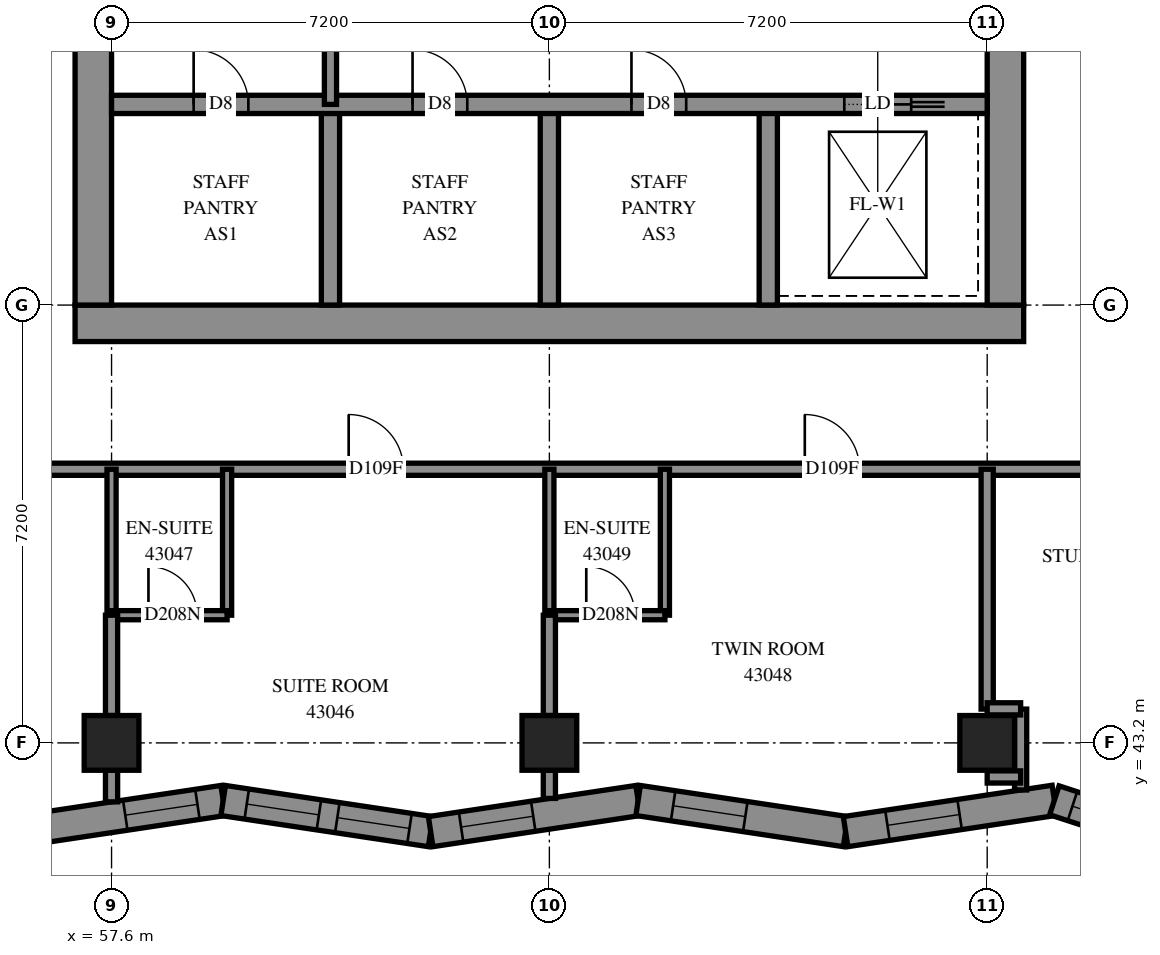
"""IFC4 building model, lengths in metres.
Left out: names, types, materials, properties, quantities, classifications, styles, units other than length and angle.
Written with IfcOpenShell. Run it as: python <this file> out.ifc"""

import sys

from ifc_helpers import new_model, si_unit, direction, frame, frame_2d, origin, origin_2d, place, context, subcontext, project, spatial, polyline, rectangle, outline, extrude, element, fill, save


model = new_model("IFC4")
c1 = context("Model", 3, precision=1e-05, world=origin(), true_north=direction((0.0, 1.0)))
c2 = subcontext(c1, "Body", "Model", "MODEL_VIEW")
j1 = project(units=[si_unit("LENGTHUNIT", "METRE"), si_unit("PLANEANGLEUNIT", "RADIAN")], contexts=[c1])
p1 = place(None, origin())
s1 = spatial("IfcSite", under=j1, at=p1, CompositionType="ELEMENT")
p2 = place(p1, origin())
s2 = spatial("IfcBuilding", under=s1, at=p2, CompositionType="ELEMENT")
p3 = place(p2, frame((0.0, 0.0, 159.2)))
s3 = spatial("IfcBuildingStorey", under=s2, at=p3, CompositionType="ELEMENT", Elevation=159.2)
for number, where, z_axis, x_axis in (
    (1, (57.6, 43.2, 0.0), (0.0, 0.0, 1.0), (1.0, 0.0, 0.0)),
    (2, (64.8, 43.2, 0.0), (0.0, 0.0, 1.0), (1.0, 0.0, 0.0)),
    (3, (72.0, 43.2, 0.0), (0.0, 0.0, 1.0), (1.0, 0.0, 0.0)),
):
    element("IfcColumn", number, at=place(p3, frame(where, z_axis=z_axis, x_axis=x_axis)), inside=s3, PredefinedType="COLUMN", context=c2, shape_type="SweptSolid", body=[
        extrude(rectangle(XDim=0.9, YDim=0.9, at=origin_2d()), origin(), (0.0, 0.0, 1.0), 3.1),
    ])
p4 = place(p3, frame((57.0, 50.1, -0.3), z_axis=(0.0, 0.0, 1.0), x_axis=(1.0, 0.0, 0.0)))
e4 = element("IfcWall", 4, at=p4, inside=s3, PredefinedType="SHEAR", context=c2, shape_type="SweptSolid", body=[
    extrude(rectangle(XDim=15.6, YDim=0.6, at=frame_2d((7.8, 0.0))), origin(), (0.0, 0.0, 1.0), 2.7),
])
p5 = place(p3, frame((57.3, 50.4, -0.3), z_axis=(0.0, 0.0, 1.0), x_axis=(0.0, 1.0, 0.0)))
e5 = element("IfcWall", 5, at=p5, inside=s3, PredefinedType="SHEAR", context=c2, shape_type="SweptSolid", body=[
    extrude(rectangle(XDim=14.4, YDim=0.6, at=frame_2d((7.2, 0.0))), origin(), (0.0, 0.0, 1.0), 2.7),
])
p6 = place(p5, frame((4.55, 0.0, 0.3)))
e6 = element("IfcOpeningElement", 6, at=p6, cuts=e5, PredefinedType="OPENING", context=c2, shape_type="SweptSolid", body=[
    extrude(rectangle(XDim=1.1, YDim=2.1, at=frame_2d((0.55, 1.05))), frame((0.0, 0.31, 0.0), z_axis=(0.0, -1.0, 0.0), x_axis=(1.0, 0.0, 0.0)), (0.0, 0.0, 1.0), 0.62),
])
p7 = place(p5, frame((11.35, 0.0, 0.3)))
e7 = element("IfcOpeningElement", 7, at=p7, cuts=e5, PredefinedType="OPENING", context=c2, shape_type="SweptSolid", body=[
    extrude(rectangle(XDim=1.1, YDim=2.1, at=frame_2d((0.55, 1.05))), frame((0.0, 0.31, 0.0), z_axis=(0.0, -1.0, 0.0), x_axis=(1.0, 0.0, 0.0)), (0.0, 0.0, 1.0), 0.62),
])
p8 = place(p3, frame((72.3, 50.4, -0.3), z_axis=(0.0, 0.0, 1.0), x_axis=(0.0, 1.0, 0.0)))
e8 = element("IfcWall", 8, at=p8, inside=s3, PredefinedType="SHEAR", context=c2, shape_type="SweptSolid", body=[
    extrude(rectangle(XDim=14.4, YDim=0.6, at=frame_2d((7.2, 0.0))), origin(), (0.0, 0.0, 1.0), 2.7),
])
p9 = place(p8, frame((4.55, 0.0, 0.3)))
e9 = element("IfcOpeningElement", 9, at=p9, cuts=e8, PredefinedType="OPENING", context=c2, shape_type="SweptSolid", body=[
    extrude(rectangle(XDim=1.1, YDim=2.1, at=frame_2d((0.55, 1.05))), frame((0.0, 0.31, 0.0), z_axis=(0.0, -1.0, 0.0), x_axis=(1.0, 0.0, 0.0)), (0.0, 0.0, 1.0), 0.62),
])
p10 = place(p8, frame((11.35, 0.0, 0.3)))
e10 = element("IfcOpeningElement", 10, at=p10, cuts=e8, PredefinedType="OPENING", context=c2, shape_type="SweptSolid", body=[
    extrude(rectangle(XDim=1.1, YDim=2.1, at=frame_2d((0.55, 1.05))), frame((0.0, 0.31, 0.0), z_axis=(0.0, -1.0, 0.0), x_axis=(1.0, 0.0, 0.0)), (0.0, 0.0, 1.0), 0.62),
])
for number, where, z_axis, x_axis in (
    (11, (61.2, 50.4, 0.0), (0.0, 0.0, 1.0), (0.0, 1.0, 0.0)),
    (12, (64.8, 50.4, 0.0), (0.0, 0.0, 1.0), (0.0, 1.0, 0.0)),
    (13, (68.4, 50.4, 0.0), (0.0, 0.0, 1.0), (0.0, 1.0, 0.0)),
):
    element("IfcWall", number, at=place(p3, frame(where, z_axis=z_axis, x_axis=x_axis)), inside=s3, PredefinedType="SOLIDWALL", context=c2, shape_type="SweptSolid", body=[
        extrude(rectangle(XDim=3.3, YDim=0.3, at=frame_2d((1.65, 0.0))), origin(), (0.0, 0.0, 1.0), 3.1),
    ])
p11 = place(p3, frame((57.6, 53.7, 0.0), z_axis=(0.0, 0.0, 1.0), x_axis=(1.0, 0.0, 0.0)))
e14 = element("IfcWall", 14, at=p11, inside=s3, PredefinedType="SOLIDWALL", context=c2, shape_type="SweptSolid", body=[
    extrude(rectangle(XDim=14.4, YDim=0.3, at=frame_2d((7.2, 0.0))), origin(), (0.0, 0.0, 1.0), 3.1),
])
p12 = place(p11, frame((1.35, 0.0, 0.0)))
e15 = element("IfcOpeningElement", 15, at=p12, cuts=e14, PredefinedType="OPENING", context=c2, shape_type="SweptSolid", body=[
    extrude(rectangle(XDim=0.9, YDim=2.1, at=frame_2d((0.45, 1.05))), frame((0.0, 0.16, 0.0), z_axis=(0.0, -1.0, 0.0), x_axis=(1.0, 0.0, 0.0)), (0.0, 0.0, 1.0), 0.32),
])
p13 = place(p11, frame((4.95, 0.0, 0.0)))
e16 = element("IfcOpeningElement", 16, at=p13, cuts=e14, PredefinedType="OPENING", context=c2, shape_type="SweptSolid", body=[
    extrude(rectangle(XDim=0.9, YDim=2.1, at=frame_2d((0.45, 1.05))), frame((0.0, 0.16, 0.0), z_axis=(0.0, -1.0, 0.0), x_axis=(1.0, 0.0, 0.0)), (0.0, 0.0, 1.0), 0.32),
])
p14 = place(p11, frame((8.55, 0.0, 0.0)))
e17 = element("IfcOpeningElement", 17, at=p14, cuts=e14, PredefinedType="OPENING", context=c2, shape_type="SweptSolid", body=[
    extrude(rectangle(XDim=0.9, YDim=2.1, at=frame_2d((0.45, 1.05))), frame((0.0, 0.16, 0.0), z_axis=(0.0, -1.0, 0.0), x_axis=(1.0, 0.0, 0.0)), (0.0, 0.0, 1.0), 0.32),
])
p15 = place(p11, frame((12.05, 0.0, 0.0)))
e18 = element("IfcOpeningElement", 18, at=p15, cuts=e14, PredefinedType="OPENING", context=c2, shape_type="SweptSolid", body=[
    extrude(rectangle(XDim=1.1, YDim=2.1, at=frame_2d((0.55, 1.05))), frame((0.0, 0.16, 0.0), z_axis=(0.0, -1.0, 0.0), x_axis=(1.0, 0.0, 0.0)), (0.0, 0.0, 1.0), 0.32),
])
p16 = place(p3, frame((56.024, 41.741, 0.0), z_axis=(0.0, 0.0, 1.0), x_axis=(0.9889272091, 0.1484013984, 0.0)))
e19 = element("IfcWall", 19, at=p16, inside=s3, PredefinedType="SOLIDWALL", context=c2, shape_type="SweptSolid", body=[
    extrude(outline(polyline([(-0.037, -0.25), (3.413, -0.25), (3.488, 0.25), (0.037, 0.25), (-0.037, -0.25)])), origin(), (0.0, 0.0, 1.0), 3.1),
])
p17 = place(p16, frame((1.822, 0.0, 0.45)))
e20 = element("IfcOpeningElement", 20, at=p17, cuts=e19, PredefinedType="OPENING", context=c2, shape_type="SweptSolid", body=[
    extrude(rectangle(XDim=1.2, YDim=2.5, at=frame_2d((0.6, 1.25))), frame((0.0, 0.26, 0.0), z_axis=(0.0, -1.0, 0.0), x_axis=(1.0, 0.0, 0.0)), (0.0, 0.0, 1.0), 0.52),
])
p18 = place(p3, frame((59.436, 42.253, 0.0), z_axis=(0.0, 0.0, 1.0), x_axis=(0.9889272091, -0.1484013984, 0.0)))
e21 = element("IfcWall", 21, at=p18, inside=s3, PredefinedType="SOLIDWALL", context=c2, shape_type="SweptSolid", body=[
    extrude(outline(polyline([(0.037, -0.25), (3.488, -0.25), (3.413, 0.25), (-0.037, 0.25), (0.037, -0.25)])), origin(), (0.0, 0.0, 1.0), 3.1),
])
p19 = place(p18, frame((0.392, 0.0, 0.45)))
e22 = element("IfcOpeningElement", 22, at=p19, cuts=e21, PredefinedType="OPENING", context=c2, shape_type="SweptSolid", body=[
    extrude(rectangle(XDim=1.2, YDim=2.5, at=frame_2d((0.6, 1.25))), frame((0.0, 0.26, 0.0), z_axis=(0.0, -1.0, 0.0), x_axis=(1.0, 0.0, 0.0)), (0.0, 0.0, 1.0), 0.52),
])
p20 = place(p18, frame((1.898, 0.0, 0.45)))
e23 = element("IfcOpeningElement", 23, at=p20, cuts=e21, PredefinedType="OPENING", context=c2, shape_type="SweptSolid", body=[
    extrude(rectangle(XDim=1.2, YDim=2.5, at=frame_2d((0.6, 1.25))), frame((0.0, 0.26, 0.0), z_axis=(0.0, -1.0, 0.0), x_axis=(1.0, 0.0, 0.0)), (0.0, 0.0, 1.0), 0.52),
])
p21 = place(p3, frame((62.848, 41.741, 0.0), z_axis=(0.0, 0.0, 1.0), x_axis=(0.9889278474, 0.1483971447, 0.0)))
e24 = element("IfcWall", 24, at=p21, inside=s3, PredefinedType="SOLIDWALL", context=c2, shape_type="SweptSolid", body=[
    extrude(outline(polyline([(-0.037, -0.25), (3.413, -0.25), (3.488, 0.25), (0.037, 0.25), (-0.037, -0.25)])), origin(), (0.0, 0.0, 1.0), 3.1),
])
p22 = place(p21, frame((0.506, 0.0, 0.45)))
e25 = element("IfcOpeningElement", 25, at=p22, cuts=e24, PredefinedType="OPENING", context=c2, shape_type="SweptSolid", body=[
    extrude(rectangle(XDim=1.2, YDim=2.5, at=frame_2d((0.6, 1.25))), frame((0.0, 0.26, 0.0), z_axis=(0.0, -1.0, 0.0), x_axis=(1.0, 0.0, 0.0)), (0.0, 0.0, 1.0), 0.52),
])
p23 = place(p3, frame((66.26, 42.253, 0.0), z_axis=(0.0, 0.0, 1.0), x_axis=(0.9889272091, -0.1484013984, 0.0)))
e26 = element("IfcWall", 26, at=p23, inside=s3, PredefinedType="SOLIDWALL", context=c2, shape_type="SweptSolid", body=[
    extrude(outline(polyline([(0.037, -0.25), (3.488, -0.25), (3.413, 0.25), (-0.037, 0.25), (0.037, -0.25)])), origin(), (0.0, 0.0, 1.0), 3.1),
])
p24 = place(p23, frame((0.582, 0.0, 0.45)))
e27 = element("IfcOpeningElement", 27, at=p24, cuts=e26, PredefinedType="OPENING", context=c2, shape_type="SweptSolid", body=[
    extrude(rectangle(XDim=1.2, YDim=2.5, at=frame_2d((0.6, 1.25))), frame((0.0, 0.26, 0.0), z_axis=(0.0, -1.0, 0.0), x_axis=(1.0, 0.0, 0.0)), (0.0, 0.0, 1.0), 0.52),
])
p25 = place(p3, frame((69.671, 41.741, 0.0), z_axis=(0.0, 0.0, 1.0), x_axis=(0.9889270545, 0.1484024288, 0.0)))
e28 = element("IfcWall", 28, at=p25, inside=s3, PredefinedType="SOLIDWALL", context=c2, shape_type="SweptSolid", body=[
    extrude(outline(polyline([(-0.037, -0.25), (3.413, -0.25), (3.531, 0.25), (0.037, 0.25), (-0.037, -0.25)])), origin(), (0.0, 0.0, 1.0), 3.1),
])
p26 = place(p25, frame((0.696, 0.0, 0.45)))
e29 = element("IfcOpeningElement", 29, at=p26, cuts=e28, PredefinedType="OPENING", context=c2, shape_type="SweptSolid", body=[
    extrude(rectangle(XDim=1.2, YDim=2.5, at=frame_2d((0.6, 1.25))), frame((0.0, 0.26, 0.0), z_axis=(0.0, -1.0, 0.0), x_axis=(1.0, 0.0, 0.0)), (0.0, 0.0, 1.0), 0.52),
])
p27 = place(p3, frame((73.105, 42.256, 0.0), z_axis=(0.0, 0.0, 1.0), x_axis=(0.9507748373, -0.3098825725, 0.0)))
e30 = element("IfcWall", 30, at=p27, inside=s3, PredefinedType="SOLIDWALL", context=c2, shape_type="SweptSolid", body=[
    extrude(outline(polyline([(0.059, -0.25), (3.648, -0.25), (3.698, 0.25), (-0.059, 0.25), (0.059, -0.25)])), origin(), (0.0, 0.0, 1.0), 3.1),
])
p28 = place(p27, frame((0.312, 0.0, 0.45)))
e31 = element("IfcOpeningElement", 31, at=p28, cuts=e30, PredefinedType="OPENING", context=c2, shape_type="SweptSolid", body=[
    extrude(rectangle(XDim=1.2, YDim=2.5, at=frame_2d((0.6, 1.25))), frame((0.0, 0.26, 0.0), z_axis=(0.0, -1.0, 0.0), x_axis=(1.0, 0.0, 0.0)), (0.0, 0.0, 1.0), 0.52),
])
p29 = place(p3, frame((61.2, 53.7, 0.0), z_axis=(0.0, 0.0, 1.0), x_axis=(0.0, 1.0, 0.0)))
e32 = element("IfcWall", 32, at=p29, inside=s3, PredefinedType="PARTITIONING", context=c2, shape_type="SweptSolid", body=[
    extrude(rectangle(XDim=3.6, YDim=0.2, at=frame_2d((1.8, 0.0))), origin(), (0.0, 0.0, 1.0), 3.1),
])
p30 = place(p3, frame((54.9, 47.7, 0.0), z_axis=(0.0, 0.0, 1.0), x_axis=(1.0, 0.0, 0.0)))
e33 = element("IfcWall", 33, at=p30, inside=s3, PredefinedType="PARTITIONING", context=c2, shape_type="SweptSolid", body=[
    extrude(rectangle(XDim=19.326, YDim=0.2, at=frame_2d((9.663, 0.0))), origin(), (0.0, 0.0, 1.0), 3.1),
])
p31 = place(p30, frame((6.599, 0.0, 0.0)))
e34 = element("IfcOpeningElement", 34, at=p31, cuts=e33, PredefinedType="OPENING", context=c2, shape_type="SweptSolid", body=[
    extrude(rectangle(XDim=0.9, YDim=2.1, at=frame_2d((0.45, 1.05))), frame((0.0, 0.11, 0.0), z_axis=(0.0, -1.0, 0.0), x_axis=(1.0, 0.0, 0.0)), (0.0, 0.0, 1.0), 0.22),
])
p32 = place(p30, frame((14.101, 0.0, 0.0)))
e35 = element("IfcOpeningElement", 35, at=p32, cuts=e33, PredefinedType="OPENING", context=c2, shape_type="SweptSolid", body=[
    extrude(rectangle(XDim=0.9, YDim=2.1, at=frame_2d((0.45, 1.05))), frame((0.0, 0.11, 0.0), z_axis=(0.0, -1.0, 0.0), x_axis=(1.0, 0.0, 0.0)), (0.0, 0.0, 1.0), 0.22),
])
p33 = place(p3, frame((72.0, 43.756, 0.0), z_axis=(0.0, 0.0, 1.0), x_axis=(0.0, 1.0, 0.0)))
e36 = element("IfcWall", 36, at=p33, inside=s3, PredefinedType="PARTITIONING", context=c2, shape_type="SweptSolid", body=[
    extrude(rectangle(XDim=3.944, YDim=0.2, at=frame_2d((1.972, 0.0))), origin(), (0.0, 0.0, 1.0), 3.1),
])
for number, where, z_axis, x_axis in (
    (37, (59.5, 45.3, 0.0), (0.0, 0.0, 1.0), (0.0, 1.0, 0.0)),
    (38, (57.6, 45.3, 0.0), (0.0, 0.0, 1.0), (0.0, 1.0, 0.0)),
    (39, (66.7, 45.3, 0.0), (0.0, 0.0, 1.0), (0.0, 1.0, 0.0)),
    (40, (64.8, 45.3, 0.0), (0.0, 0.0, 1.0), (0.0, 1.0, 0.0)),
):
    element("IfcWall", number, at=place(p3, frame(where, z_axis=z_axis, x_axis=x_axis)), inside=s3, PredefinedType="PARTITIONING", context=c2, shape_type="SweptSolid", body=[
        extrude(rectangle(XDim=2.4, YDim=0.15, at=frame_2d((1.2, 0.0))), origin(), (0.0, 0.0, 1.0), 3.1),
    ])
p34 = place(p3, frame((64.8, 45.3, 0.0), z_axis=(0.0, 0.0, 1.0), x_axis=(1.0, 0.0, 0.0)))
e41 = element("IfcWall", 41, at=p34, inside=s3, PredefinedType="PARTITIONING", context=c2, shape_type="SweptSolid", body=[
    extrude(rectangle(XDim=1.9, YDim=0.15, at=frame_2d((0.95, 0.0))), origin(), (0.0, 0.0, 1.0), 3.1),
])
p35 = place(p34, frame((0.607, 0.0, 0.0)))
e42 = element("IfcOpeningElement", 42, at=p35, cuts=e41, PredefinedType="OPENING", context=c2, shape_type="SweptSolid", body=[
    extrude(rectangle(XDim=0.8, YDim=2.1, at=frame_2d((0.4, 1.05))), frame((0.0, 0.085, 0.0), z_axis=(0.0, -1.0, 0.0), x_axis=(1.0, 0.0, 0.0)), (0.0, 0.0, 1.0), 0.17),
])
p36 = place(p3, frame((57.6, 45.3, 0.0), z_axis=(0.0, 0.0, 1.0), x_axis=(1.0, 0.0, 0.0)))
e43 = element("IfcWall", 43, at=p36, inside=s3, PredefinedType="PARTITIONING", context=c2, shape_type="SweptSolid", body=[
    extrude(rectangle(XDim=1.9, YDim=0.15, at=frame_2d((0.95, 0.0))), origin(), (0.0, 0.0, 1.0), 3.1),
])
p37 = place(p36, frame((0.607, 0.0, 0.0)))
e44 = element("IfcOpeningElement", 44, at=p37, cuts=e43, PredefinedType="OPENING", context=c2, shape_type="SweptSolid", body=[
    extrude(rectangle(XDim=0.8, YDim=2.1, at=frame_2d((0.4, 1.05))), frame((0.0, 0.085, 0.0), z_axis=(0.0, -1.0, 0.0), x_axis=(1.0, 0.0, 0.0)), (0.0, 0.0, 1.0), 0.17),
])
for number, where, z_axis, x_axis in (
    (45, (57.6, 43.65, 0.0), (0.0, 0.0, 1.0), (0.0, 1.0, 0.0)),
    (46, (64.8, 43.65, 0.0), (0.0, 0.0, 1.0), (0.0, 1.0, 0.0)),
):
    element("IfcWall", number, at=place(p3, frame(where, z_axis=z_axis, x_axis=x_axis)), inside=s3, PredefinedType="PARTITIONING", context=c2, shape_type="SweptSolid", body=[
        extrude(rectangle(XDim=1.65, YDim=0.2, at=frame_2d((0.825, 0.0))), origin(), (0.0, 0.0, 1.0), 3.1),
    ])
p38 = place(p3, frame((72.55, 42.426, 0.0), z_axis=(0.0, 0.0, 1.0), x_axis=(0.0, 1.0, 0.0)))
e47 = element("IfcWall", 47, at=p38, inside=s3, PredefinedType="PARTITIONING", context=c2, shape_type="SweptSolid", body=[
    extrude(rectangle(XDim=1.33, YDim=0.2, at=frame_2d((0.665, 0.0))), origin(), (0.0, 0.0, 1.0), 3.1),
])
for number, where, z_axis, x_axis in (
    (48, (72.0, 43.76, 0.0), (0.0, 0.0, 1.0), (1.0, 0.0, 0.0)),
    (49, (72.0, 42.64, 0.0), (0.0, 0.0, 1.0), (1.0, 0.0, 0.0)),
):
    element("IfcWall", number, at=place(p3, frame(where, z_axis=z_axis, x_axis=x_axis)), inside=s3, PredefinedType="PARTITIONING", context=c2, shape_type="SweptSolid", body=[
        extrude(rectangle(XDim=0.55, YDim=0.2, at=frame_2d((0.275, 0.0))), origin(), (0.0, 0.0, 1.0), 3.1),
    ])
p39 = place(p3, frame((57.6, 42.23, 0.0), z_axis=(0.0, 0.0, 1.0), x_axis=(0.0, 1.0, 0.0)))
e50 = element("IfcWall", 50, at=p39, inside=s3, PredefinedType="PARTITIONING", context=c2, shape_type="SweptSolid", body=[
    extrude(rectangle(XDim=0.52, YDim=0.2, at=frame_2d((0.26, 0.0))), origin(), (0.0, 0.0, 1.0), 3.1),
])
p40 = place(p3, frame((64.8, 42.287, 0.0), z_axis=(0.0, 0.0, 1.0), x_axis=(0.0, 1.0, 0.0)))
e51 = element("IfcWall", 51, at=p40, inside=s3, PredefinedType="PARTITIONING", context=c2, shape_type="SweptSolid", body=[
    extrude(rectangle(XDim=0.463, YDim=0.2, at=frame_2d((0.232, 0.0))), origin(), (0.0, 0.0, 1.0), 3.1),
])
p41 = place(p17, origin())
e52 = element("IfcWindow", 52, at=p41, inside=s3, PartitioningType="SINGLE_PANEL", PredefinedType="WINDOW", context=c2, shape_type="SweptSolid", body=[
    extrude(rectangle(XDim=1.2, YDim=2.5, at=frame_2d((0.6, 1.25))), frame((0.0, 0.18, 0.0), z_axis=(0.0, -1.0, 0.0), x_axis=(1.0, 0.0, 0.0)), (0.0, 0.0, 1.0), 0.06),
])
fill(e20, e52)
p42 = place(p19, origin())
e53 = element("IfcWindow", 53, at=p42, inside=s3, PartitioningType="SINGLE_PANEL", PredefinedType="WINDOW", context=c2, shape_type="SweptSolid", body=[
    extrude(rectangle(XDim=1.2, YDim=2.5, at=frame_2d((0.6, 1.25))), frame((0.0, 0.18, 0.0), z_axis=(0.0, -1.0, 0.0), x_axis=(1.0, 0.0, 0.0)), (0.0, 0.0, 1.0), 0.06),
])
fill(e22, e53)
p43 = place(p20, origin())
e54 = element("IfcWindow", 54, at=p43, inside=s3, PartitioningType="SINGLE_PANEL", PredefinedType="WINDOW", context=c2, shape_type="SweptSolid", body=[
    extrude(rectangle(XDim=1.2, YDim=2.5, at=frame_2d((0.6, 1.25))), frame((0.0, 0.18, 0.0), z_axis=(0.0, -1.0, 0.0), x_axis=(1.0, 0.0, 0.0)), (0.0, 0.0, 1.0), 0.06),
])
fill(e23, e54)
p44 = place(p22, origin())
e55 = element("IfcWindow", 55, at=p44, inside=s3, PartitioningType="SINGLE_PANEL", PredefinedType="WINDOW", context=c2, shape_type="SweptSolid", body=[
    extrude(rectangle(XDim=1.2, YDim=2.5, at=frame_2d((0.6, 1.25))), frame((0.0, 0.18, 0.0), z_axis=(0.0, -1.0, 0.0), x_axis=(1.0, 0.0, 0.0)), (0.0, 0.0, 1.0), 0.06),
])
fill(e25, e55)
p45 = place(p24, origin())
e56 = element("IfcWindow", 56, at=p45, inside=s3, PartitioningType="SINGLE_PANEL", PredefinedType="WINDOW", context=c2, shape_type="SweptSolid", body=[
    extrude(rectangle(XDim=1.2, YDim=2.5, at=frame_2d((0.6, 1.25))), frame((0.0, 0.18, 0.0), z_axis=(0.0, -1.0, 0.0), x_axis=(1.0, 0.0, 0.0)), (0.0, 0.0, 1.0), 0.06),
])
fill(e27, e56)
p46 = place(p26, origin())
e57 = element("IfcWindow", 57, at=p46, inside=s3, PartitioningType="SINGLE_PANEL", PredefinedType="WINDOW", context=c2, shape_type="SweptSolid", body=[
    extrude(rectangle(XDim=1.2, YDim=2.5, at=frame_2d((0.6, 1.25))), frame((0.0, 0.18, 0.0), z_axis=(0.0, -1.0, 0.0), x_axis=(1.0, 0.0, 0.0)), (0.0, 0.0, 1.0), 0.06),
])
fill(e29, e57)
p47 = place(p28, origin())
e58 = element("IfcWindow", 58, at=p47, inside=s3, PartitioningType="SINGLE_PANEL", PredefinedType="WINDOW", context=c2, shape_type="SweptSolid", body=[
    extrude(rectangle(XDim=1.2, YDim=2.5, at=frame_2d((0.6, 1.25))), frame((0.0, 0.18, 0.0), z_axis=(0.0, -1.0, 0.0), x_axis=(1.0, 0.0, 0.0)), (0.0, 0.0, 1.0), 0.06),
])
fill(e31, e58)
p48 = place(p12, origin())
e59 = element("IfcDoor", 59, at=p48, inside=s3, OperationType="SINGLE_SWING_LEFT", PredefinedType="DOOR", context=c2, shape_type="SweptSolid", body=[
    extrude(rectangle(XDim=0.9, YDim=2.1, at=frame_2d((0.45, 1.05))), frame((0.0, 0.025, 0.0), z_axis=(0.0, -1.0, 0.0), x_axis=(1.0, 0.0, 0.0)), (0.0, 0.0, 1.0), 0.05),
])
fill(e15, e59)
p49 = place(p13, origin())
e60 = element("IfcDoor", 60, at=p49, inside=s3, OperationType="SINGLE_SWING_LEFT", PredefinedType="DOOR", context=c2, shape_type="SweptSolid", body=[
    extrude(rectangle(XDim=0.9, YDim=2.1, at=frame_2d((0.45, 1.05))), frame((0.0, 0.025, 0.0), z_axis=(0.0, -1.0, 0.0), x_axis=(1.0, 0.0, 0.0)), (0.0, 0.0, 1.0), 0.05),
])
fill(e16, e60)
p50 = place(p14, origin())
e61 = element("IfcDoor", 61, at=p50, inside=s3, OperationType="SINGLE_SWING_LEFT", PredefinedType="DOOR", context=c2, shape_type="SweptSolid", body=[
    extrude(rectangle(XDim=0.9, YDim=2.1, at=frame_2d((0.45, 1.05))), frame((0.0, 0.025, 0.0), z_axis=(0.0, -1.0, 0.0), x_axis=(1.0, 0.0, 0.0)), (0.0, 0.0, 1.0), 0.05),
])
fill(e17, e61)
p51 = place(p15, origin())
e62 = element("IfcDoor", 62, at=p51, inside=s3, OperationType="SLIDING_TO_RIGHT", PredefinedType="DOOR", context=c2, shape_type="SweptSolid", body=[
    extrude(rectangle(XDim=1.1, YDim=2.1, at=frame_2d((0.55, 1.05))), frame((0.0, 0.025, 0.0), z_axis=(0.0, -1.0, 0.0), x_axis=(1.0, 0.0, 0.0)), (0.0, 0.0, 1.0), 0.05),
])
fill(e18, e62)
p52 = place(p31, origin())
e63 = element("IfcDoor", 63, at=p52, inside=s3, OperationType="SINGLE_SWING_LEFT", PredefinedType="DOOR", context=c2, shape_type="SweptSolid", body=[
    extrude(rectangle(XDim=0.9, YDim=2.1, at=frame_2d((0.45, 1.05))), frame((0.0, 0.025, 0.0), z_axis=(0.0, -1.0, 0.0), x_axis=(1.0, 0.0, 0.0)), (0.0, 0.0, 1.0), 0.05),
])
fill(e34, e63)
p53 = place(p37, origin())
e64 = element("IfcDoor", 64, at=p53, inside=s3, OperationType="SINGLE_SWING_RIGHT", PredefinedType="DOOR", context=c2, shape_type="SweptSolid", body=[
    extrude(rectangle(XDim=0.8, YDim=2.1, at=frame_2d((0.4, 1.05))), frame((0.0, 0.025, 0.0), z_axis=(0.0, -1.0, 0.0), x_axis=(1.0, 0.0, 0.0)), (0.0, 0.0, 1.0), 0.05),
])
fill(e44, e64)
p54 = place(p32, origin())
e65 = element("IfcDoor", 65, at=p54, inside=s3, OperationType="SINGLE_SWING_LEFT", PredefinedType="DOOR", context=c2, shape_type="SweptSolid", body=[
    extrude(rectangle(XDim=0.9, YDim=2.1, at=frame_2d((0.45, 1.05))), frame((0.0, 0.025, 0.0), z_axis=(0.0, -1.0, 0.0), x_axis=(1.0, 0.0, 0.0)), (0.0, 0.0, 1.0), 0.05),
])
fill(e35, e65)
p55 = place(p35, origin())
e66 = element("IfcDoor", 66, at=p55, inside=s3, OperationType="SINGLE_SWING_RIGHT", PredefinedType="DOOR", context=c2, shape_type="SweptSolid", body=[
    extrude(rectangle(XDim=0.8, YDim=2.1, at=frame_2d((0.4, 1.05))), frame((0.0, 0.025, 0.0), z_axis=(0.0, -1.0, 0.0), x_axis=(1.0, 0.0, 0.0)), (0.0, 0.0, 1.0), 0.05),
])
fill(e42, e66)
save(model, sys.argv[1])
